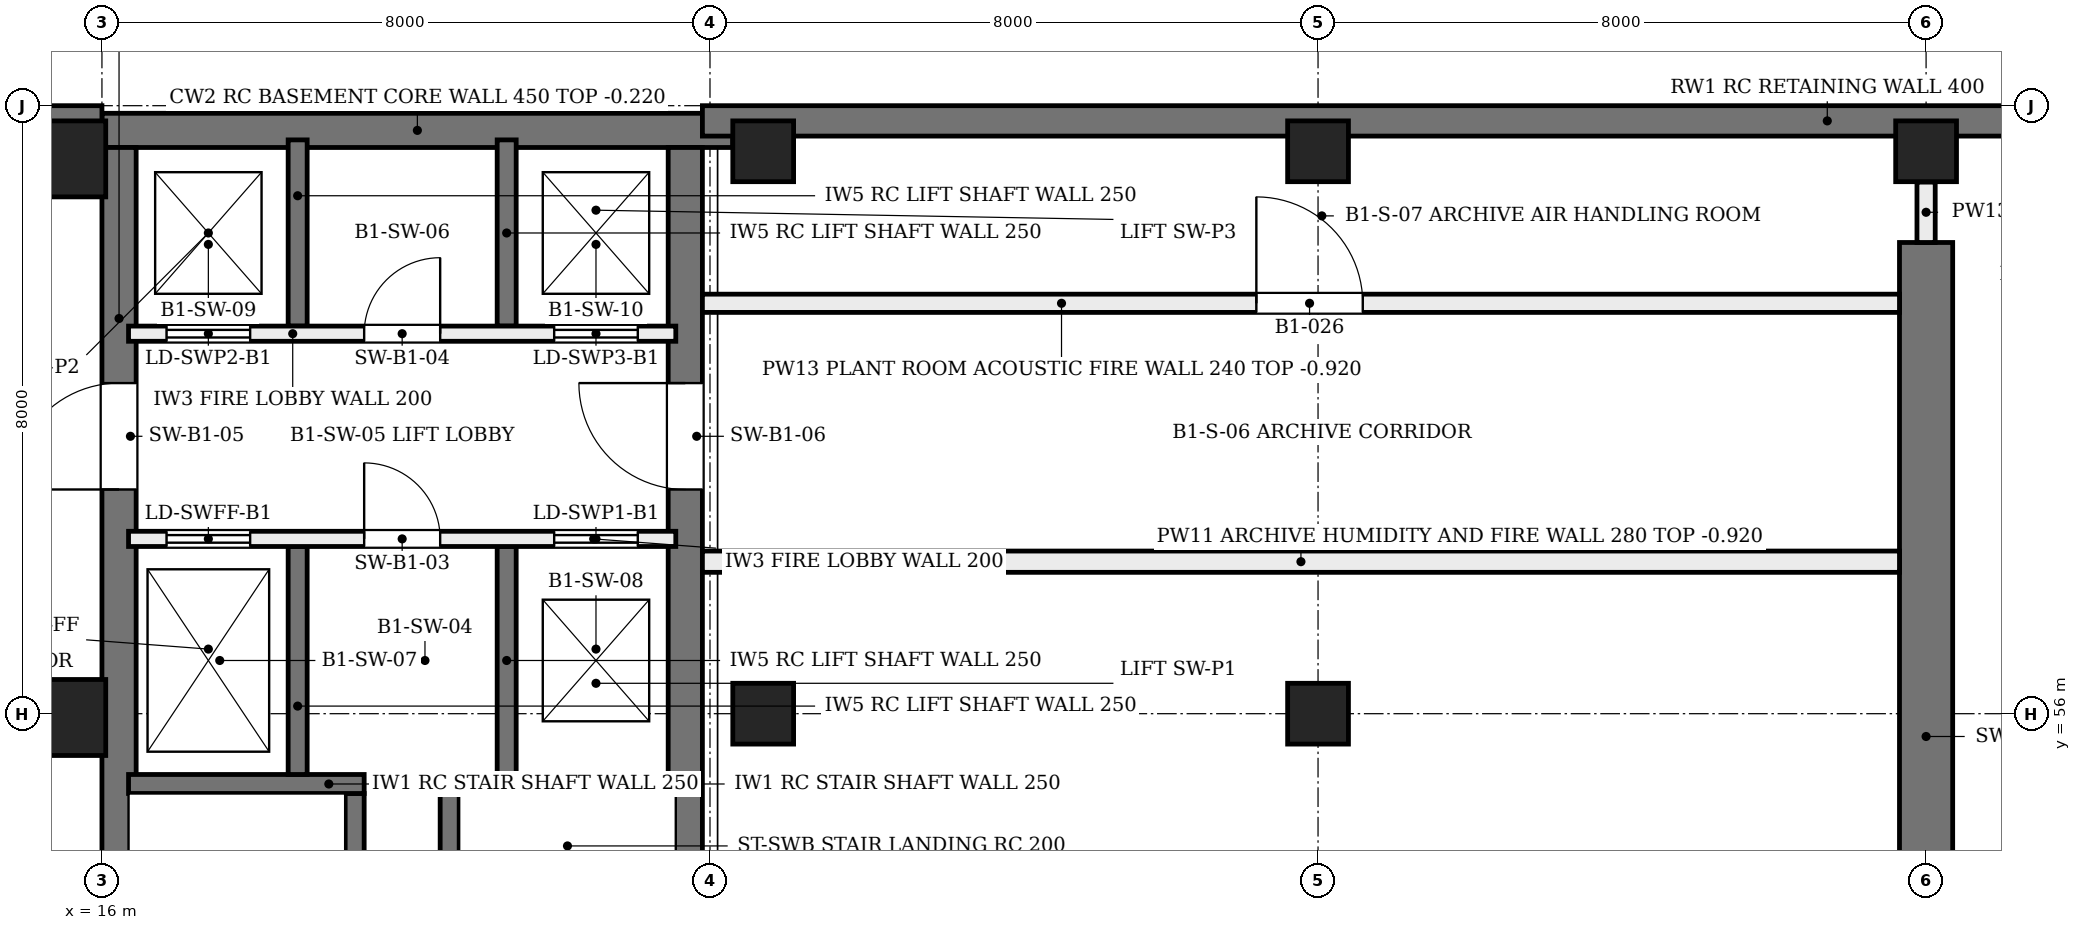
"""IFC4 building model, lengths in metres.
Left out: names, types, materials, properties, quantities, classifications, styles, units other than length and angle.
Written with IfcOpenShell. Run it as: python <this file> out.ifc"""

import sys

from ifc_helpers import new_model, si_unit, direction, frame, frame_2d, origin, origin_2d, place, context, subcontext, project, spatial, rectangle, extrude, element, fill, save


model = new_model("IFC4")
c1 = context("Model", 3, precision=1e-05, world=origin(), true_north=direction((0.0, 1.0)))
c2 = subcontext(c1, "Body", "Model", "MODEL_VIEW")
j1 = project(units=[si_unit("LENGTHUNIT", "METRE"), si_unit("PLANEANGLEUNIT", "RADIAN")], contexts=[c1])
p1 = place(None, origin())
s1 = spatial("IfcSite", under=j1, at=p1, CompositionType="ELEMENT")
p2 = place(p1, origin())
s2 = spatial("IfcBuilding", under=s1, at=p2, CompositionType="ELEMENT")
p3 = place(p2, frame((0.0, 0.0, -4.8)))
s3 = spatial("IfcBuildingStorey", under=s2, at=p3, CompositionType="ELEMENT", Elevation=-4.8)
p4 = place(p3, frame((40.0, 49.2, 0.0), z_axis=(0.0, 0.0, 1.0), x_axis=(0.0, 1.0, 0.0)))
e1 = element("IfcWall", 1, at=p4, inside=s3, PredefinedType="SHEAR", context=c2, shape_type="SweptSolid", body=[
    extrude(rectangle(XDim=13.0, YDim=0.7, at=frame_2d((6.5, 0.0))), origin(), (0.0, 0.0, 1.0), 4.55),
])
p5 = place(p4, frame((3.68, 0.0, 0.0)))
e2 = element("IfcOpeningElement", 2, at=p5, cuts=e1, PredefinedType="OPENING", context=c2, shape_type="SweptSolid", body=[
    extrude(rectangle(XDim=1.3, YDim=2.4, at=frame_2d((0.65, 1.2))), frame((0.0, 0.36, 0.0), z_axis=(0.0, -1.0, 0.0), x_axis=(1.0, 0.0, 0.0)), (0.0, 0.0, 1.0), 0.72),
])
p6 = place(p3, frame((16.0, 63.675, 0.0), z_axis=(0.0, 0.0, 1.0), x_axis=(1.0, 0.0, 0.0)))
e3 = element("IfcWall", 3, at=p6, inside=s3, PredefinedType="SHEAR", context=c2, shape_type="SweptSolid", body=[
    extrude(rectangle(XDim=8.3, YDim=0.45, at=frame_2d((4.15, 0.0))), origin(), (0.0, 0.0, 1.0), 4.58),
])
p7 = place(p3, frame((16.225, 48.45, 0.0), z_axis=(0.0, 0.0, 1.0), x_axis=(0.0, 1.0, 0.0)))
e4 = element("IfcWall", 4, at=p7, inside=s3, PredefinedType="SHEAR", context=c2, shape_type="SweptSolid", body=[
    extrude(rectangle(XDim=15.0, YDim=0.45, at=frame_2d((7.5, 0.0))), origin(), (0.0, 0.0, 1.0), 4.58),
])
p8 = place(p7, frame((0.85, 0.0, 0.0)))
e5 = element("IfcOpeningElement", 5, at=p8, cuts=e4, PredefinedType="OPENING", context=c2, shape_type="SweptSolid", body=[
    extrude(rectangle(XDim=1.0, YDim=2.1, at=frame_2d((0.5, 1.05))), frame((0.0, 0.235, 0.0), z_axis=(0.0, -1.0, 0.0), x_axis=(1.0, 0.0, 0.0)), (0.0, 0.0, 1.0), 0.47),
])
p9 = place(p7, frame((10.5, 0.0, 0.0)))
e6 = element("IfcOpeningElement", 6, at=p9, cuts=e4, PredefinedType="OPENING", context=c2, shape_type="SweptSolid", body=[
    extrude(rectangle(XDim=1.4, YDim=2.1, at=frame_2d((0.7, 1.05))), frame((0.0, 0.235, 0.0), z_axis=(0.0, -1.0, 0.0), x_axis=(1.0, 0.0, 0.0)), (0.0, 0.0, 1.0), 0.47),
])
p10 = place(p3, frame((23.675, 48.45, 0.0), z_axis=(0.0, 0.0, 1.0), x_axis=(0.0, 1.0, 0.0)))
e7 = element("IfcWall", 7, at=p10, inside=s3, PredefinedType="SHEAR", context=c2, shape_type="SweptSolid", body=[
    extrude(rectangle(XDim=15.0, YDim=0.45, at=frame_2d((7.5, 0.0))), origin(), (0.0, 0.0, 1.0), 4.58),
])
p11 = place(p10, frame((0.85, 0.0, 0.0)))
e8 = element("IfcOpeningElement", 8, at=p11, cuts=e7, PredefinedType="OPENING", context=c2, shape_type="SweptSolid", body=[
    extrude(rectangle(XDim=1.0, YDim=2.1, at=frame_2d((0.5, 1.05))), frame((0.0, 0.235, 0.0), z_axis=(0.0, -1.0, 0.0), x_axis=(1.0, 0.0, 0.0)), (0.0, 0.0, 1.0), 0.47),
])
p12 = place(p10, frame((10.5, 0.0, 0.0)))
e9 = element("IfcOpeningElement", 9, at=p12, cuts=e7, PredefinedType="OPENING", context=c2, shape_type="SweptSolid", body=[
    extrude(rectangle(XDim=1.4, YDim=2.1, at=frame_2d((0.7, 1.05))), frame((0.0, 0.235, 0.0), z_axis=(0.0, -1.0, 0.0), x_axis=(1.0, 0.0, 0.0)), (0.0, 0.0, 1.0), 0.47),
])
for number, where, z_axis, x_axis in (
    (10, (15.55, 55.95, 0.0), (0.0, 0.0, 1.0), (1.0, 0.0, 0.0)),
    (11, (15.55, 63.3, 0.0), (0.0, 0.0, 1.0), (1.0, 0.0, 0.0)),
):
    element("IfcColumn", number, at=place(p3, frame(where, z_axis=z_axis, x_axis=x_axis)), inside=s3, PredefinedType="COLUMN", context=c2, shape_type="SweptSolid", body=[
        extrude(rectangle(XDim=1.0, YDim=1.0, at=origin_2d()), origin(), (0.0, 0.0, 1.0), 4.8),
    ])
for number, where, z_axis, x_axis in (
    (12, (24.7, 56.0, 0.0), (0.0, 0.0, 1.0), (1.0, 0.0, 0.0)),
    (13, (32.0, 56.0, 0.0), (0.0, 0.0, 1.0), (1.0, 0.0, 0.0)),
    (14, (24.7, 63.4, 0.0), (0.0, 0.0, 1.0), (1.0, 0.0, 0.0)),
    (15, (32.0, 63.4, 0.0), (0.0, 0.0, 1.0), (1.0, 0.0, 0.0)),
    (16, (40.0, 63.4, 0.0), (0.0, 0.0, 1.0), (1.0, 0.0, 0.0)),
):
    element("IfcColumn", number, at=place(p3, frame(where, z_axis=z_axis, x_axis=x_axis)), inside=s3, PredefinedType="COLUMN", context=c2, shape_type="SweptSolid", body=[
        extrude(rectangle(XDim=0.8, YDim=0.8, at=origin_2d()), origin(), (0.0, 0.0, 1.0), 4.58),
    ])
p13 = place(p3, frame((8.0, 63.8, 0.0), z_axis=(0.0, 0.0, 1.0), x_axis=(1.0, 0.0, 0.0)))
e17 = element("IfcWall", 17, at=p13, inside=s3, PredefinedType="SOLIDWALL", context=c2, shape_type="SweptSolid", body=[
    extrude(rectangle(XDim=8.0, YDim=0.4, at=frame_2d((4.0, 0.0))), origin(), (0.0, 0.0, 1.0), 4.55),
])
p14 = place(p3, frame((23.9, 63.8, 0.0), z_axis=(0.0, 0.0, 1.0), x_axis=(1.0, 0.0, 0.0)))
e18 = element("IfcWall", 18, at=p14, inside=s3, PredefinedType="SOLIDWALL", context=c2, shape_type="SweptSolid", body=[
    extrude(rectangle(XDim=56.2, YDim=0.4, at=frame_2d((28.1, 0.0))), origin(), (0.0, 0.0, 1.0), 4.55),
])
for number, where, z_axis, x_axis in (
    (19, (19.325, 48.35, 0.0), (0.0, 0.0, 1.0), (0.0, 1.0, 0.0)),
    (20, (20.575, 48.35, 0.0), (0.0, 0.0, 1.0), (0.0, 1.0, 0.0)),
):
    element("IfcWall", number, at=place(p3, frame(where, z_axis=z_axis, x_axis=x_axis)), inside=s3, PredefinedType="SOLIDWALL", context=c2, shape_type="SweptSolid", body=[
        extrude(rectangle(XDim=6.6, YDim=0.25, at=frame_2d((3.3, 0.0))), origin(), (0.0, 0.0, 1.0), 4.55),
    ])
p15 = place(p3, frame((16.35, 55.075, 0.0), z_axis=(0.0, 0.0, 1.0), x_axis=(1.0, 0.0, 0.0)))
e21 = element("IfcWall", 21, at=p15, inside=s3, PredefinedType="SOLIDWALL", context=c2, shape_type="SweptSolid", body=[
    extrude(rectangle(XDim=3.1, YDim=0.25, at=frame_2d((1.55, 0.0))), origin(), (0.0, 0.0, 1.0), 4.55),
])
p16 = place(p3, frame((20.45, 55.075, 0.0), z_axis=(0.0, 0.0, 1.0), x_axis=(1.0, 0.0, 0.0)))
e22 = element("IfcWall", 22, at=p16, inside=s3, PredefinedType="SOLIDWALL", context=c2, shape_type="SweptSolid", body=[
    extrude(rectangle(XDim=3.1, YDim=0.25, at=frame_2d((1.55, 0.0))), origin(), (0.0, 0.0, 1.0), 4.55),
])
p17 = place(p3, frame((18.575, 55.2, 0.0), z_axis=(0.0, 0.0, 1.0), x_axis=(0.0, 1.0, 0.0)))
e23 = element("IfcWall", 23, at=p17, inside=s3, PredefinedType="SOLIDWALL", context=c2, shape_type="SweptSolid", body=[
    extrude(rectangle(XDim=3.0, YDim=0.25, at=frame_2d((1.5, 0.0))), origin(), (0.0, 0.0, 1.0), 4.55),
])
p18 = place(p3, frame((18.575, 61.1, 0.0), z_axis=(0.0, 0.0, 1.0), x_axis=(0.0, 1.0, 0.0)))
e24 = element("IfcWall", 24, at=p18, inside=s3, PredefinedType="SOLIDWALL", context=c2, shape_type="SweptSolid", body=[
    extrude(rectangle(XDim=2.45, YDim=0.25, at=frame_2d((1.225, 0.0))), origin(), (0.0, 0.0, 1.0), 4.55),
])
p19 = place(p3, frame((21.325, 55.2, 0.0), z_axis=(0.0, 0.0, 1.0), x_axis=(0.0, 1.0, 0.0)))
e25 = element("IfcWall", 25, at=p19, inside=s3, PredefinedType="SOLIDWALL", context=c2, shape_type="SweptSolid", body=[
    extrude(rectangle(XDim=3.0, YDim=0.25, at=frame_2d((1.5, 0.0))), origin(), (0.0, 0.0, 1.0), 4.55),
])
p20 = place(p3, frame((21.325, 61.1, 0.0), z_axis=(0.0, 0.0, 1.0), x_axis=(0.0, 1.0, 0.0)))
e26 = element("IfcWall", 26, at=p20, inside=s3, PredefinedType="SOLIDWALL", context=c2, shape_type="SweptSolid", body=[
    extrude(rectangle(XDim=2.45, YDim=0.25, at=frame_2d((1.225, 0.0))), origin(), (0.0, 0.0, 1.0), 4.55),
])
p21 = place(p3, frame((16.35, 58.3, 0.0), z_axis=(0.0, 0.0, 1.0), x_axis=(1.0, 0.0, 0.0)))
e27 = element("IfcWall", 27, at=p21, inside=s3, PredefinedType="SOLIDWALL", context=c2, shape_type="SweptSolid", body=[
    extrude(rectangle(XDim=7.2, YDim=0.2, at=frame_2d((3.6, 0.0))), origin(), (0.0, 0.0, 1.0), 4.55),
])
p22 = place(p21, frame((0.5, 0.0, 0.0)))
e28 = element("IfcOpeningElement", 28, at=p22, cuts=e27, PredefinedType="OPENING", context=c2, shape_type="SweptSolid", body=[
    extrude(rectangle(XDim=1.1, YDim=2.1, at=frame_2d((0.55, 1.05))), frame((0.0, 0.11, 0.0), z_axis=(0.0, -1.0, 0.0), x_axis=(1.0, 0.0, 0.0)), (0.0, 0.0, 1.0), 0.22),
])
p23 = place(p21, frame((5.6, 0.0, 0.0)))
e29 = element("IfcOpeningElement", 29, at=p23, cuts=e27, PredefinedType="OPENING", context=c2, shape_type="SweptSolid", body=[
    extrude(rectangle(XDim=1.1, YDim=2.1, at=frame_2d((0.55, 1.05))), frame((0.0, 0.11, 0.0), z_axis=(0.0, -1.0, 0.0), x_axis=(1.0, 0.0, 0.0)), (0.0, 0.0, 1.0), 0.22),
])
p24 = place(p21, frame((3.1, 0.0, 0.0)))
e30 = element("IfcOpeningElement", 30, at=p24, cuts=e27, PredefinedType="OPENING", context=c2, shape_type="SweptSolid", body=[
    extrude(rectangle(XDim=1.0, YDim=2.1, at=frame_2d((0.5, 1.05))), frame((0.0, 0.11, 0.0), z_axis=(0.0, -1.0, 0.0), x_axis=(1.0, 0.0, 0.0)), (0.0, 0.0, 1.0), 0.22),
])
p25 = place(p3, frame((16.35, 61.0, 0.0), z_axis=(0.0, 0.0, 1.0), x_axis=(1.0, 0.0, 0.0)))
e31 = element("IfcWall", 31, at=p25, inside=s3, PredefinedType="SOLIDWALL", context=c2, shape_type="SweptSolid", body=[
    extrude(rectangle(XDim=7.2, YDim=0.2, at=frame_2d((3.6, 0.0))), origin(), (0.0, 0.0, 1.0), 4.55),
])
p26 = place(p25, frame((0.5, 0.0, 0.0)))
e32 = element("IfcOpeningElement", 32, at=p26, cuts=e31, PredefinedType="OPENING", context=c2, shape_type="SweptSolid", body=[
    extrude(rectangle(XDim=1.1, YDim=2.1, at=frame_2d((0.55, 1.05))), frame((0.0, 0.11, 0.0), z_axis=(0.0, -1.0, 0.0), x_axis=(1.0, 0.0, 0.0)), (0.0, 0.0, 1.0), 0.22),
])
p27 = place(p25, frame((5.6, 0.0, 0.0)))
e33 = element("IfcOpeningElement", 33, at=p27, cuts=e31, PredefinedType="OPENING", context=c2, shape_type="SweptSolid", body=[
    extrude(rectangle(XDim=1.1, YDim=2.1, at=frame_2d((0.55, 1.05))), frame((0.0, 0.11, 0.0), z_axis=(0.0, -1.0, 0.0), x_axis=(1.0, 0.0, 0.0)), (0.0, 0.0, 1.0), 0.22),
])
p28 = place(p25, frame((3.1, 0.0, 0.0)))
e34 = element("IfcOpeningElement", 34, at=p28, cuts=e31, PredefinedType="OPENING", context=c2, shape_type="SweptSolid", body=[
    extrude(rectangle(XDim=1.0, YDim=2.1, at=frame_2d((0.5, 1.05))), frame((0.0, 0.11, 0.0), z_axis=(0.0, -1.0, 0.0), x_axis=(1.0, 0.0, 0.0)), (0.0, 0.0, 1.0), 0.22),
])
p29 = place(p3, frame((40.0, 62.2, 0.0), z_axis=(0.0, 0.0, 1.0), x_axis=(0.0, 1.0, 0.0)))
e35 = element("IfcWall", 35, at=p29, inside=s3, PredefinedType="PARTITIONING", context=c2, shape_type="SweptSolid", body=[
    extrude(rectangle(XDim=0.795, YDim=0.24, at=frame_2d((0.397, 0.0))), origin(), (0.0, 0.0, 1.0), 3.98),
])
p30 = place(p3, frame((23.9, 58.0, 0.0), z_axis=(0.0, 0.0, 1.0), x_axis=(1.0, 0.0, 0.0)))
e36 = element("IfcWall", 36, at=p30, inside=s3, PredefinedType="PARTITIONING", context=c2, shape_type="SweptSolid", body=[
    extrude(rectangle(XDim=15.75, YDim=0.28, at=frame_2d((7.875, 0.0))), origin(), (0.0, 0.0, 1.0), 3.88),
])
p31 = place(p3, frame((23.9, 61.4, 0.0), z_axis=(0.0, 0.0, 1.0), x_axis=(1.0, 0.0, 0.0)))
e37 = element("IfcWall", 37, at=p31, inside=s3, PredefinedType="PARTITIONING", context=c2, shape_type="SweptSolid", body=[
    extrude(rectangle(XDim=15.75, YDim=0.24, at=frame_2d((7.875, 0.0))), origin(), (0.0, 0.0, 1.0), 3.88),
])
p32 = place(p31, frame((7.289, 0.0, 0.0)))
e38 = element("IfcOpeningElement", 38, at=p32, cuts=e37, PredefinedType="OPENING", context=c2, shape_type="SweptSolid", body=[
    extrude(rectangle(XDim=1.4, YDim=2.4, at=frame_2d((0.7, 1.2))), frame((0.0, 0.13, 0.0), z_axis=(0.0, -1.0, 0.0), x_axis=(1.0, 0.0, 0.0)), (0.0, 0.0, 1.0), 0.26),
])
p33 = place(p22, origin())
e39 = element("IfcDoor", 39, at=p33, inside=s3, OperationType="DOUBLE_DOOR_SLIDING", PredefinedType="DOOR", context=c2, shape_type="SweptSolid", body=[
    extrude(rectangle(XDim=1.1, YDim=2.1, at=frame_2d((0.55, 1.05))), frame((0.0, 0.025, 0.0), z_axis=(0.0, -1.0, 0.0), x_axis=(1.0, 0.0, 0.0)), (0.0, 0.0, 1.0), 0.05),
])
fill(e28, e39)
p34 = place(p23, origin())
e40 = element("IfcDoor", 40, at=p34, inside=s3, OperationType="DOUBLE_DOOR_SLIDING", PredefinedType="DOOR", context=c2, shape_type="SweptSolid", body=[
    extrude(rectangle(XDim=1.1, YDim=2.1, at=frame_2d((0.55, 1.05))), frame((0.0, 0.025, 0.0), z_axis=(0.0, -1.0, 0.0), x_axis=(1.0, 0.0, 0.0)), (0.0, 0.0, 1.0), 0.05),
])
fill(e29, e40)
p35 = place(p26, frame((1.1, 0.0, 0.0), z_axis=(0.0, 0.0, 1.0), x_axis=(-1.0, 0.0, 0.0)))
e41 = element("IfcDoor", 41, at=p35, inside=s3, OperationType="DOUBLE_DOOR_SLIDING", PredefinedType="DOOR", context=c2, shape_type="SweptSolid", body=[
    extrude(rectangle(XDim=1.1, YDim=2.1, at=frame_2d((0.55, 1.05))), frame((0.0, 0.025, 0.0), z_axis=(0.0, -1.0, 0.0), x_axis=(1.0, 0.0, 0.0)), (0.0, 0.0, 1.0), 0.05),
])
fill(e32, e41)
p36 = place(p27, frame((1.1, 0.0, 0.0), z_axis=(0.0, 0.0, 1.0), x_axis=(-1.0, 0.0, 0.0)))
e42 = element("IfcDoor", 42, at=p36, inside=s3, OperationType="DOUBLE_DOOR_SLIDING", PredefinedType="DOOR", context=c2, shape_type="SweptSolid", body=[
    extrude(rectangle(XDim=1.1, YDim=2.1, at=frame_2d((0.55, 1.05))), frame((0.0, 0.025, 0.0), z_axis=(0.0, -1.0, 0.0), x_axis=(1.0, 0.0, 0.0)), (0.0, 0.0, 1.0), 0.05),
])
fill(e33, e42)
p37 = place(p24, origin())
e43 = element("IfcDoor", 43, at=p37, inside=s3, OperationType="SINGLE_SWING_LEFT", PredefinedType="DOOR", context=c2, shape_type="SweptSolid", body=[
    extrude(rectangle(XDim=1.0, YDim=2.1, at=frame_2d((0.5, 1.05))), frame((0.0, 0.025, 0.0), z_axis=(0.0, -1.0, 0.0), x_axis=(1.0, 0.0, 0.0)), (0.0, 0.0, 1.0), 0.05),
])
fill(e30, e43)
p38 = place(p28, frame((1.0, 0.0, 0.0), z_axis=(0.0, 0.0, 1.0), x_axis=(-1.0, 0.0, 0.0)))
e44 = element("IfcDoor", 44, at=p38, inside=s3, OperationType="SINGLE_SWING_RIGHT", PredefinedType="DOOR", context=c2, shape_type="SweptSolid", body=[
    extrude(rectangle(XDim=1.0, YDim=2.1, at=frame_2d((0.5, 1.05))), frame((0.0, 0.025, 0.0), z_axis=(0.0, -1.0, 0.0), x_axis=(1.0, 0.0, 0.0)), (0.0, 0.0, 1.0), 0.05),
])
fill(e34, e44)
p39 = place(p9, origin())
e45 = element("IfcDoor", 45, at=p39, inside=s3, OperationType="SINGLE_SWING_LEFT", PredefinedType="DOOR", context=c2, shape_type="SweptSolid", body=[
    extrude(rectangle(XDim=1.4, YDim=2.1, at=frame_2d((0.7, 1.05))), frame((0.0, 0.025, 0.0), z_axis=(0.0, -1.0, 0.0), x_axis=(1.0, 0.0, 0.0)), (0.0, 0.0, 1.0), 0.05),
])
fill(e6, e45)
p40 = place(p12, frame((1.4, 0.0, 0.0), z_axis=(0.0, 0.0, 1.0), x_axis=(-1.0, 0.0, 0.0)))
e46 = element("IfcDoor", 46, at=p40, inside=s3, OperationType="SINGLE_SWING_RIGHT", PredefinedType="DOOR", context=c2, shape_type="SweptSolid", body=[
    extrude(rectangle(XDim=1.4, YDim=2.1, at=frame_2d((0.7, 1.05))), frame((0.0, 0.025, 0.0), z_axis=(0.0, -1.0, 0.0), x_axis=(1.0, 0.0, 0.0)), (0.0, 0.0, 1.0), 0.05),
])
fill(e9, e46)
p41 = place(p32, origin())
e47 = element("IfcDoor", 47, at=p41, inside=s3, OperationType="SINGLE_SWING_LEFT", PredefinedType="DOOR", context=c2, shape_type="SweptSolid", body=[
    extrude(rectangle(XDim=1.4, YDim=2.4, at=frame_2d((0.7, 1.2))), frame((0.0, 0.025, 0.0), z_axis=(0.0, -1.0, 0.0), x_axis=(1.0, 0.0, 0.0)), (0.0, 0.0, 1.0), 0.05),
])
fill(e38, e47)
save(model, sys.argv[1])
